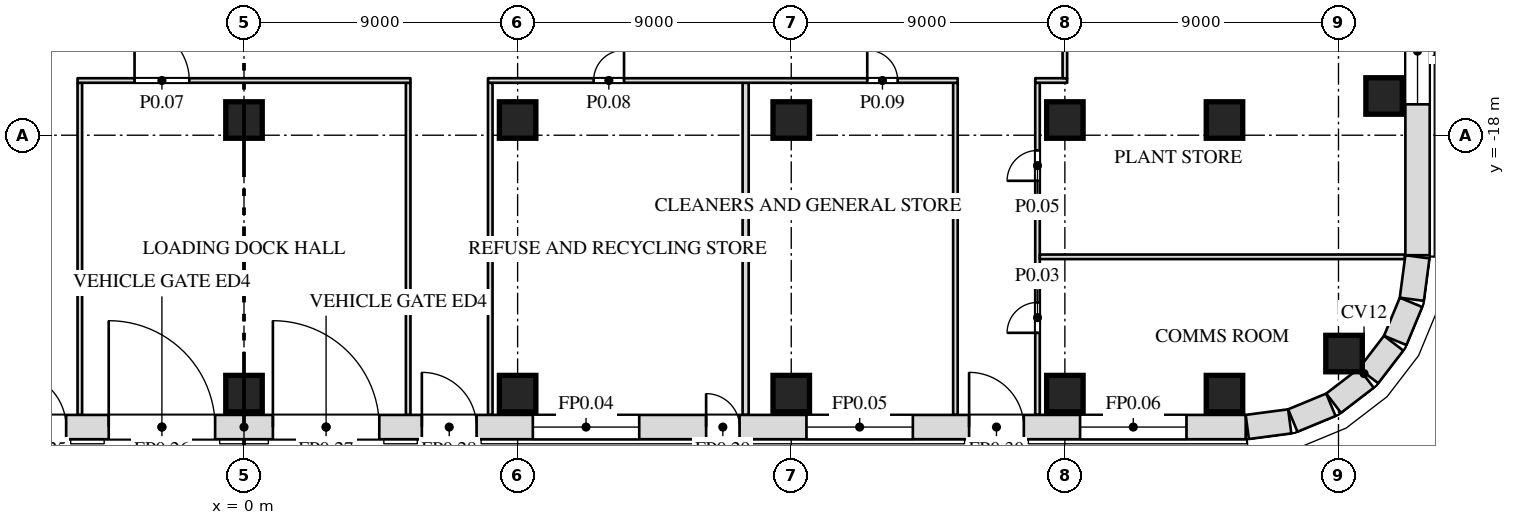
"""IFC4 building model, lengths in metres.
Left out: names, types, materials, properties, quantities, classifications, styles, units other than length and angle.
Written with IfcOpenShell. Run it as: python <this file> out.ifc"""

import sys

from ifc_helpers import new_model, si_unit, direction, frame, frame_2d, origin, origin_2d, place, context, subcontext, project, spatial, rectangle, extrude, element, fill, save


model = new_model("IFC4")
c1 = context("Model", 3, precision=1e-05, world=origin(), true_north=direction((0.0, 1.0)))
c2 = subcontext(c1, "Body", "Model", "MODEL_VIEW")
j1 = project(units=[si_unit("LENGTHUNIT", "METRE"), si_unit("PLANEANGLEUNIT", "RADIAN")], contexts=[c1])
p1 = place(None, origin())
s1 = spatial("IfcSite", under=j1, at=p1, CompositionType="ELEMENT")
p2 = place(p1, origin())
s2 = spatial("IfcBuilding", under=s1, at=p2, CompositionType="ELEMENT")
p3 = place(p2, origin())
s3 = spatial("IfcBuildingStorey", under=s2, at=p3, CompositionType="ELEMENT", Elevation=0.0)
for number, where, z_axis, x_axis in (
    (1, (0.0, -26.5, 0.0), (0.0, 0.0, 1.0), (1.0, 0.0, 0.0)),
    (2, (9.0, -26.5, 0.0), (0.0, 0.0, 1.0), (1.0, 0.0, 0.0)),
    (3, (18.0, -26.5, 0.0), (0.0, 0.0, 1.0), (1.0, 0.0, 0.0)),
    (4, (27.0, -26.5, 0.0), (0.0, 0.0, 1.0), (1.0, 0.0, 0.0)),
    (5, (32.25, -26.5, 0.0), (0.0, 0.0, 1.0), (1.0, 0.0, 0.0)),
    (6, (36.182, -25.182, 0.0), (0.0, 0.0, 1.0), (1.0, 0.0, 0.0)),
    (7, (0.0, -17.5, 0.0), (0.0, 0.0, 1.0), (1.0, 0.0, 0.0)),
    (8, (9.0, -17.5, 0.0), (0.0, 0.0, 1.0), (1.0, 0.0, 0.0)),
    (9, (18.0, -17.5, 0.0), (0.0, 0.0, 1.0), (1.0, 0.0, 0.0)),
    (10, (27.0, -17.5, 0.0), (0.0, 0.0, 1.0), (1.0, 0.0, 0.0)),
    (11, (32.25, -17.5, 0.0), (0.0, 0.0, 1.0), (1.0, 0.0, 0.0)),
    (12, (37.5, -16.709, 0.0), (0.0, 0.0, 1.0), (1.0, 0.0, 0.0)),
):
    element("IfcColumn", number, at=place(p3, frame(where, z_axis=z_axis, x_axis=x_axis)), inside=s3, PredefinedType="COLUMN", context=c2, shape_type="SweptSolid", body=[
        extrude(rectangle(XDim=1.2, YDim=1.2, at=origin_2d()), origin(), (0.0, 0.0, 1.0), 9.0),
    ])
for number, where, z_axis, x_axis in (
    (13, (-5.4, -27.2, 0.0), (0.0, 0.0, 1.0), (0.0, 1.0, 0.0)),
    (14, (5.4, -27.2, 0.0), (0.0, 0.0, 1.0), (0.0, 1.0, 0.0)),
    (15, (8.1, -27.2, 0.0), (0.0, 0.0, 1.0), (0.0, 1.0, 0.0)),
):
    element("IfcWall", number, at=place(p3, frame(where, z_axis=z_axis, x_axis=x_axis)), inside=s3, PredefinedType="PARTITIONING", context=c2, shape_type="SweptSolid", body=[
        extrude(rectangle(XDim=10.925, YDim=0.15, at=frame_2d((5.462, 0.0))), origin(), (0.0, 0.0, 1.0), 8.7),
    ])
p4 = place(p3, frame((16.5, -27.2, 0.0), z_axis=(0.0, 0.0, 1.0), x_axis=(0.0, 1.0, 0.0)))
e16 = element("IfcWall", 16, at=p4, inside=s3, PredefinedType="PARTITIONING", context=c2, shape_type="SweptSolid", body=[
    extrude(rectangle(XDim=10.925, YDim=0.2, at=frame_2d((5.462, 0.0))), origin(), (0.0, 0.0, 1.0), 8.7),
])
p5 = place(p3, frame((23.4, -27.2, 0.0), z_axis=(0.0, 0.0, 1.0), x_axis=(0.0, 1.0, 0.0)))
e17 = element("IfcWall", 17, at=p5, inside=s3, PredefinedType="PARTITIONING", context=c2, shape_type="SweptSolid", body=[
    extrude(rectangle(XDim=10.925, YDim=0.15, at=frame_2d((5.462, 0.0))), origin(), (0.0, 0.0, 1.0), 8.7),
])
p6 = place(p3, frame((26.1, -27.2, 0.0), z_axis=(0.0, 0.0, 1.0), x_axis=(0.0, 1.0, 0.0)))
e18 = element("IfcWall", 18, at=p6, inside=s3, PredefinedType="PARTITIONING", context=c2, shape_type="SweptSolid", body=[
    extrude(rectangle(XDim=10.925, YDim=0.15, at=frame_2d((5.462, 0.0))), origin(), (0.0, 0.0, 1.0), 8.7),
])
p7 = place(p6, frame((2.7, 0.0, 0.0)))
e19 = element("IfcOpeningElement", 19, at=p7, cuts=e18, PredefinedType="OPENING", context=c2, shape_type="SweptSolid", body=[
    extrude(rectangle(XDim=1.0, YDim=2.1, at=frame_2d((0.5, 1.05))), frame((0.0, 0.087, 0.0), z_axis=(0.0, -1.0, 0.0), x_axis=(1.0, 0.0, 0.0)), (0.0, 0.0, 1.0), 0.174),
])
p8 = place(p6, frame((7.7, 0.0, 0.0)))
e20 = element("IfcOpeningElement", 20, at=p8, cuts=e18, PredefinedType="OPENING", context=c2, shape_type="SweptSolid", body=[
    extrude(rectangle(XDim=1.0, YDim=2.1, at=frame_2d((0.5, 1.05))), frame((0.0, 0.087, 0.0), z_axis=(0.0, -1.0, 0.0), x_axis=(1.0, 0.0, 0.0)), (0.0, 0.0, 1.0), 0.174),
])
p9 = place(p3, frame((26.175, -22.0, 0.0), z_axis=(0.0, 0.0, 1.0), x_axis=(1.0, 0.0, 0.0)))
e21 = element("IfcWall", 21, at=p9, inside=s3, PredefinedType="PARTITIONING", context=c2, shape_type="SweptSolid", body=[
    extrude(rectangle(XDim=12.005, YDim=0.15, at=frame_2d((6.002, 0.0))), origin(), (0.0, 0.0, 1.0), 8.7),
])
p10 = place(p3, frame((-5.475, -16.2, 0.0), z_axis=(0.0, 0.0, 1.0), x_axis=(1.0, 0.0, 0.0)))
e22 = element("IfcWall", 22, at=p10, inside=s3, PredefinedType="PARTITIONING", context=c2, shape_type="SweptSolid", body=[
    extrude(rectangle(XDim=10.95, YDim=0.15, at=frame_2d((5.475, 0.0))), origin(), (0.0, 0.0, 1.0), 8.7),
])
p11 = place(p10, frame((1.875, 0.0, 0.0)))
e23 = element("IfcOpeningElement", 23, at=p11, cuts=e22, PredefinedType="OPENING", context=c2, shape_type="SweptSolid", body=[
    extrude(rectangle(XDim=1.8, YDim=2.1, at=frame_2d((0.9, 1.05))), frame((0.0, 0.087, 0.0), z_axis=(0.0, -1.0, 0.0), x_axis=(1.0, 0.0, 0.0)), (0.0, 0.0, 1.0), 0.174),
])
p12 = place(p3, frame((8.025, -16.2, 0.0), z_axis=(0.0, 0.0, 1.0), x_axis=(1.0, 0.0, 0.0)))
e24 = element("IfcWall", 24, at=p12, inside=s3, PredefinedType="PARTITIONING", context=c2, shape_type="SweptSolid", body=[
    extrude(rectangle(XDim=15.45, YDim=0.15, at=frame_2d((7.725, 0.0))), origin(), (0.0, 0.0, 1.0), 8.7),
])
p13 = place(p12, frame((3.475, 0.0, 0.0)))
e25 = element("IfcOpeningElement", 25, at=p13, cuts=e24, PredefinedType="OPENING", context=c2, shape_type="SweptSolid", body=[
    extrude(rectangle(XDim=1.0, YDim=2.1, at=frame_2d((0.5, 1.05))), frame((0.0, 0.087, 0.0), z_axis=(0.0, -1.0, 0.0), x_axis=(1.0, 0.0, 0.0)), (0.0, 0.0, 1.0), 0.174),
])
p14 = place(p12, frame((12.475, 0.0, 0.0)))
e26 = element("IfcOpeningElement", 26, at=p14, cuts=e24, PredefinedType="OPENING", context=c2, shape_type="SweptSolid", body=[
    extrude(rectangle(XDim=1.0, YDim=2.1, at=frame_2d((0.5, 1.05))), frame((0.0, 0.087, 0.0), z_axis=(0.0, -1.0, 0.0), x_axis=(1.0, 0.0, 0.0)), (0.0, 0.0, 1.0), 0.174),
])
p15 = place(p3, frame((26.025, -16.2, 0.0), z_axis=(0.0, 0.0, 1.0), x_axis=(1.0, 0.0, 0.0)))
e27 = element("IfcWall", 27, at=p15, inside=s3, PredefinedType="PARTITIONING", context=c2, shape_type="SweptSolid", body=[
    extrude(rectangle(XDim=1.05, YDim=0.15, at=frame_2d((0.525, 0.0))), origin(), (0.0, 0.0, 1.0), 8.7),
])
p16 = place(p3, frame((27.0, -16.125, 0.0), z_axis=(0.0, 0.0, 1.0), x_axis=(0.0, 1.0, 0.0)))
e28 = element("IfcWall", 28, at=p16, inside=s3, PredefinedType="PARTITIONING", context=c2, shape_type="SweptSolid", body=[
    extrude(rectangle(XDim=2.025, YDim=0.15, at=frame_2d((1.012, 0.0))), origin(), (0.0, 0.0, 1.0), 8.088),
])
p17 = place(p3, frame((-32.948, -27.6, 0.0), z_axis=(0.0, 0.0, 1.0), x_axis=(1.0, 0.0, 0.0)))
e29 = element("IfcWall", 29, at=p17, inside=s3, PredefinedType="SOLIDWALL", context=c2, shape_type="SweptSolid", body=[
    extrude(rectangle(XDim=65.895, YDim=0.8, at=frame_2d((32.948, 0.0))), origin(), (0.0, 0.0, 1.0), 8.7),
])
p18 = place(p17, frame((1.948, 0.0, 1.0)))
e30 = element("IfcOpeningElement", 30, at=p18, cuts=e29, PredefinedType="OPENING", context=c2, shape_type="SweptSolid", body=[
    extrude(rectangle(XDim=3.5, YDim=5.5, at=frame_2d((1.75, 2.75))), frame((0.0, 0.412, 0.0), z_axis=(0.0, -1.0, 0.0), x_axis=(1.0, 0.0, 0.0)), (0.0, 0.0, 1.0), 0.824),
])
p19 = place(p17, frame((10.948, 0.0, 1.0)))
e31 = element("IfcOpeningElement", 31, at=p19, cuts=e29, PredefinedType="OPENING", context=c2, shape_type="SweptSolid", body=[
    extrude(rectangle(XDim=3.5, YDim=5.5, at=frame_2d((1.75, 2.75))), frame((0.0, 0.412, 0.0), z_axis=(0.0, -1.0, 0.0), x_axis=(1.0, 0.0, 0.0)), (0.0, 0.0, 1.0), 0.824),
])
p20 = place(p17, frame((19.948, 0.0, 1.0)))
e32 = element("IfcOpeningElement", 32, at=p20, cuts=e29, PredefinedType="OPENING", context=c2, shape_type="SweptSolid", body=[
    extrude(rectangle(XDim=3.5, YDim=5.5, at=frame_2d((1.75, 2.75))), frame((0.0, 0.412, 0.0), z_axis=(0.0, -1.0, 0.0), x_axis=(1.0, 0.0, 0.0)), (0.0, 0.0, 1.0), 0.824),
])
p21 = place(p17, frame((42.448, 0.0, 1.0)))
e33 = element("IfcOpeningElement", 33, at=p21, cuts=e29, PredefinedType="OPENING", context=c2, shape_type="SweptSolid", body=[
    extrude(rectangle(XDim=3.5, YDim=5.5, at=frame_2d((1.75, 2.75))), frame((0.0, 0.412, 0.0), z_axis=(0.0, -1.0, 0.0), x_axis=(1.0, 0.0, 0.0)), (0.0, 0.0, 1.0), 0.824),
])
p22 = place(p17, frame((51.448, 0.0, 1.0)))
e34 = element("IfcOpeningElement", 34, at=p22, cuts=e29, PredefinedType="OPENING", context=c2, shape_type="SweptSolid", body=[
    extrude(rectangle(XDim=3.5, YDim=5.5, at=frame_2d((1.75, 2.75))), frame((0.0, 0.412, 0.0), z_axis=(0.0, -1.0, 0.0), x_axis=(1.0, 0.0, 0.0)), (0.0, 0.0, 1.0), 0.824),
])
p23 = place(p17, frame((60.448, 0.0, 1.0)))
e35 = element("IfcOpeningElement", 35, at=p23, cuts=e29, PredefinedType="OPENING", context=c2, shape_type="SweptSolid", body=[
    extrude(rectangle(XDim=3.5, YDim=5.5, at=frame_2d((1.75, 2.75))), frame((0.0, 0.412, 0.0), z_axis=(0.0, -1.0, 0.0), x_axis=(1.0, 0.0, 0.0)), (0.0, 0.0, 1.0), 0.824),
])
p24 = place(p17, frame((7.298, 0.0, 0.0)))
e36 = element("IfcOpeningElement", 36, at=p24, cuts=e29, PredefinedType="OPENING", context=c2, shape_type="SweptSolid", body=[
    extrude(rectangle(XDim=1.8, YDim=2.4, at=frame_2d((0.9, 1.2))), frame((0.0, 0.412, 0.0), z_axis=(0.0, -1.0, 0.0), x_axis=(1.0, 0.0, 0.0)), (0.0, 0.0, 1.0), 0.824),
])
p25 = place(p17, frame((16.648, 0.0, 0.0)))
e37 = element("IfcOpeningElement", 37, at=p25, cuts=e29, PredefinedType="OPENING", context=c2, shape_type="SweptSolid", body=[
    extrude(rectangle(XDim=1.1, YDim=2.4, at=frame_2d((0.55, 1.2))), frame((0.0, 0.412, 0.0), z_axis=(0.0, -1.0, 0.0), x_axis=(1.0, 0.0, 0.0)), (0.0, 0.0, 1.0), 0.824),
])
p26 = place(p17, frame((25.298, 0.0, 0.0)))
e38 = element("IfcOpeningElement", 38, at=p26, cuts=e29, PredefinedType="OPENING", context=c2, shape_type="SweptSolid", body=[
    extrude(rectangle(XDim=1.8, YDim=2.4, at=frame_2d((0.9, 1.2))), frame((0.0, 0.412, 0.0), z_axis=(0.0, -1.0, 0.0), x_axis=(1.0, 0.0, 0.0)), (0.0, 0.0, 1.0), 0.824),
])
p27 = place(p17, frame((28.498, 0.0, 0.0)))
e39 = element("IfcOpeningElement", 39, at=p27, cuts=e29, PredefinedType="OPENING", context=c2, shape_type="SweptSolid", body=[
    extrude(rectangle(XDim=3.5, YDim=4.5, at=frame_2d((1.75, 2.25))), frame((0.0, 0.412, 0.0), z_axis=(0.0, -1.0, 0.0), x_axis=(1.0, 0.0, 0.0)), (0.0, 0.0, 1.0), 0.824),
])
p28 = place(p17, frame((33.898, 0.0, 0.0)))
e40 = element("IfcOpeningElement", 40, at=p28, cuts=e29, PredefinedType="OPENING", context=c2, shape_type="SweptSolid", body=[
    extrude(rectangle(XDim=3.5, YDim=4.5, at=frame_2d((1.75, 2.25))), frame((0.0, 0.412, 0.0), z_axis=(0.0, -1.0, 0.0), x_axis=(1.0, 0.0, 0.0)), (0.0, 0.0, 1.0), 0.824),
])
p29 = place(p17, frame((38.798, 0.0, 0.0)))
e41 = element("IfcOpeningElement", 41, at=p29, cuts=e29, PredefinedType="OPENING", context=c2, shape_type="SweptSolid", body=[
    extrude(rectangle(XDim=1.8, YDim=2.4, at=frame_2d((0.9, 1.2))), frame((0.0, 0.412, 0.0), z_axis=(0.0, -1.0, 0.0), x_axis=(1.0, 0.0, 0.0)), (0.0, 0.0, 1.0), 0.824),
])
p30 = place(p17, frame((48.148, 0.0, 0.0)))
e42 = element("IfcOpeningElement", 42, at=p30, cuts=e29, PredefinedType="OPENING", context=c2, shape_type="SweptSolid", body=[
    extrude(rectangle(XDim=1.1, YDim=2.4, at=frame_2d((0.55, 1.2))), frame((0.0, 0.412, 0.0), z_axis=(0.0, -1.0, 0.0), x_axis=(1.0, 0.0, 0.0)), (0.0, 0.0, 1.0), 0.824),
])
p31 = place(p17, frame((56.798, 0.0, 0.0)))
e43 = element("IfcOpeningElement", 43, at=p31, cuts=e29, PredefinedType="OPENING", context=c2, shape_type="SweptSolid", body=[
    extrude(rectangle(XDim=1.8, YDim=2.4, at=frame_2d((0.9, 1.2))), frame((0.0, 0.412, 0.0), z_axis=(0.0, -1.0, 0.0), x_axis=(1.0, 0.0, 0.0)), (0.0, 0.0, 1.0), 0.824),
])
p32 = place(p3, frame((33.0, -27.597, 0.0), z_axis=(0.0, 0.0, 1.0), x_axis=(0.99144603414, 0.130517283865, 0.0)))
e44 = element("IfcWall", 44, at=p32, inside=s3, PredefinedType="SOLIDWALL", context=c2, shape_type="SweptSolid", body=[
    extrude(rectangle(XDim=1.408, YDim=0.8, at=frame_2d((0.704, 0.0))), origin(), (0.0, 0.0, 1.0), 8.7),
])
p33 = place(p3, frame((34.497, -27.386, 0.0), z_axis=(0.0, 0.0, 1.0), x_axis=(0.923847774587, 0.38276009378, 0.0)))
e45 = element("IfcWall", 45, at=p33, inside=s3, PredefinedType="SOLIDWALL", context=c2, shape_type="SweptSolid", body=[
    extrude(rectangle(XDim=1.355, YDim=0.8, at=frame_2d((0.678, 0.0))), origin(), (0.0, 0.0, 1.0), 8.7),
])
for number, where, z_axis, x_axis in (
    (46, (35.84, -26.815, 0.0), (0.0, 0.0, 1.0), (0.793, 0.609, 0.0)),
    (47, (36.989, -25.916, 0.0), (0.0, 0.0, 1.0), (0.609, 0.793, 0.0)),
):
    element("IfcWall", number, at=place(p3, frame(where, z_axis=z_axis, x_axis=x_axis)), inside=s3, PredefinedType="SOLIDWALL", context=c2, shape_type="SweptSolid", body=[
        extrude(rectangle(XDim=1.356, YDim=0.8, at=frame_2d((0.678, 0.0))), origin(), (0.0, 0.0, 1.0), 8.7),
    ])
p34 = place(p3, frame((37.867, -24.75, 0.0), z_axis=(0.0, 0.0, 1.0), x_axis=(0.38276009378, 0.923847774587, 0.0)))
e48 = element("IfcWall", 48, at=p34, inside=s3, PredefinedType="SOLIDWALL", context=c2, shape_type="SweptSolid", body=[
    extrude(rectangle(XDim=1.355, YDim=0.8, at=frame_2d((0.678, 0.0))), origin(), (0.0, 0.0, 1.0), 8.7),
])
p35 = place(p3, frame((38.413, -23.396, 0.0), z_axis=(0.0, 0.0, 1.0), x_axis=(0.130517283865, 0.99144603414, 0.0)))
e49 = element("IfcWall", 49, at=p35, inside=s3, PredefinedType="SOLIDWALL", context=c2, shape_type="SweptSolid", body=[
    extrude(rectangle(XDim=1.408, YDim=0.8, at=frame_2d((0.704, 0.0))), origin(), (0.0, 0.0, 1.0), 8.7),
])
p36 = place(p3, frame((38.6, -21.948, 0.0), z_axis=(0.0, 0.0, 1.0), x_axis=(0.0, 1.0, 0.0)))
e50 = element("IfcWall", 50, at=p36, inside=s3, PredefinedType="SOLIDWALL", context=c2, shape_type="SweptSolid", body=[
    extrude(rectangle(XDim=35.895, YDim=0.8, at=frame_2d((17.948, 0.0))), origin(), (0.0, 0.0, 1.0), 8.7),
])
p37 = place(p36, frame((4.964, 0.0, 1.0)))
e51 = element("IfcOpeningElement", 51, at=p37, cuts=e50, PredefinedType="OPENING", context=c2, shape_type="SweptSolid", body=[
    extrude(rectangle(XDim=3.5, YDim=5.5, at=frame_2d((1.75, 2.75))), frame((0.0, 0.412, 0.0), z_axis=(0.0, -1.0, 0.0), x_axis=(1.0, 0.0, 0.0)), (0.0, 0.0, 1.0), 0.824),
])
p38 = place(p36, frame((9.458, 0.0, 1.0)))
e52 = element("IfcOpeningElement", 52, at=p38, cuts=e50, PredefinedType="OPENING", context=c2, shape_type="SweptSolid", body=[
    extrude(rectangle(XDim=3.5, YDim=5.5, at=frame_2d((1.75, 2.75))), frame((0.0, 0.412, 0.0), z_axis=(0.0, -1.0, 0.0), x_axis=(1.0, 0.0, 0.0)), (0.0, 0.0, 1.0), 0.824),
])
p39 = place(p36, frame((13.951, 0.0, 1.0)))
e53 = element("IfcOpeningElement", 53, at=p39, cuts=e50, PredefinedType="OPENING", context=c2, shape_type="SweptSolid", body=[
    extrude(rectangle(XDim=3.5, YDim=5.5, at=frame_2d((1.75, 2.75))), frame((0.0, 0.412, 0.0), z_axis=(0.0, -1.0, 0.0), x_axis=(1.0, 0.0, 0.0)), (0.0, 0.0, 1.0), 0.824),
])
p40 = place(p36, frame((22.938, 0.0, 1.0)))
e54 = element("IfcOpeningElement", 54, at=p40, cuts=e50, PredefinedType="OPENING", context=c2, shape_type="SweptSolid", body=[
    extrude(rectangle(XDim=3.5, YDim=5.5, at=frame_2d((1.75, 2.75))), frame((0.0, 0.412, 0.0), z_axis=(0.0, -1.0, 0.0), x_axis=(1.0, 0.0, 0.0)), (0.0, 0.0, 1.0), 0.824),
])
p41 = place(p36, frame((27.431, 0.0, 1.0)))
e55 = element("IfcOpeningElement", 55, at=p41, cuts=e50, PredefinedType="OPENING", context=c2, shape_type="SweptSolid", body=[
    extrude(rectangle(XDim=3.5, YDim=5.5, at=frame_2d((1.75, 2.75))), frame((0.0, 0.412, 0.0), z_axis=(0.0, -1.0, 0.0), x_axis=(1.0, 0.0, 0.0)), (0.0, 0.0, 1.0), 0.824),
])
p42 = place(p36, frame((19.294, 0.0, 0.0)))
e56 = element("IfcOpeningElement", 56, at=p42, cuts=e50, PredefinedType="OPENING", context=c2, shape_type="SweptSolid", body=[
    extrude(rectangle(XDim=1.8, YDim=2.4, at=frame_2d((0.9, 1.2))), frame((0.0, 0.412, 0.0), z_axis=(0.0, -1.0, 0.0), x_axis=(1.0, 0.0, 0.0)), (0.0, 0.0, 1.0), 0.824),
])
p43 = place(p7, origin())
e57 = element("IfcDoor", 57, at=p43, inside=s3, OperationType="SINGLE_SWING_LEFT", PredefinedType="DOOR", context=c2, shape_type="SweptSolid", body=[
    extrude(rectangle(XDim=1.0, YDim=2.1, at=frame_2d((0.5, 1.05))), frame((0.0, 0.025, 0.0), z_axis=(0.0, -1.0, 0.0), x_axis=(1.0, 0.0, 0.0)), (0.0, 0.0, 1.0), 0.05),
])
fill(e19, e57)
p44 = place(p8, origin())
e58 = element("IfcDoor", 58, at=p44, inside=s3, OperationType="SINGLE_SWING_LEFT", PredefinedType="DOOR", context=c2, shape_type="SweptSolid", body=[
    extrude(rectangle(XDim=1.0, YDim=2.1, at=frame_2d((0.5, 1.05))), frame((0.0, 0.025, 0.0), z_axis=(0.0, -1.0, 0.0), x_axis=(1.0, 0.0, 0.0)), (0.0, 0.0, 1.0), 0.05),
])
fill(e20, e58)
p45 = place(p11, origin())
e59 = element("IfcDoor", 59, at=p45, inside=s3, OperationType="DOUBLE_DOOR_SINGLE_SWING", PredefinedType="DOOR", context=c2, shape_type="SweptSolid", body=[
    extrude(rectangle(XDim=1.8, YDim=2.1, at=frame_2d((0.9, 1.05))), frame((0.0, 0.025, 0.0), z_axis=(0.0, -1.0, 0.0), x_axis=(1.0, 0.0, 0.0)), (0.0, 0.0, 1.0), 0.05),
])
fill(e23, e59)
p46 = place(p13, origin())
e60 = element("IfcDoor", 60, at=p46, inside=s3, OperationType="SINGLE_SWING_RIGHT", PredefinedType="DOOR", context=c2, shape_type="SweptSolid", body=[
    extrude(rectangle(XDim=1.0, YDim=2.1, at=frame_2d((0.5, 1.05))), frame((0.0, 0.025, 0.0), z_axis=(0.0, -1.0, 0.0), x_axis=(1.0, 0.0, 0.0)), (0.0, 0.0, 1.0), 0.05),
])
fill(e25, e60)
p47 = place(p14, origin())
e61 = element("IfcDoor", 61, at=p47, inside=s3, OperationType="SINGLE_SWING_LEFT", PredefinedType="DOOR", context=c2, shape_type="SweptSolid", body=[
    extrude(rectangle(XDim=1.0, YDim=2.1, at=frame_2d((0.5, 1.05))), frame((0.0, 0.025, 0.0), z_axis=(0.0, -1.0, 0.0), x_axis=(1.0, 0.0, 0.0)), (0.0, 0.0, 1.0), 0.05),
])
fill(e26, e61)
p48 = place(p21, origin())
e62 = element("IfcWindow", 62, at=p48, inside=s3, PartitioningType="SINGLE_PANEL", PredefinedType="WINDOW", context=c2, shape_type="SweptSolid", body=[
    extrude(rectangle(XDim=3.5, YDim=5.5, at=frame_2d((1.75, 2.75))), frame((0.0, 0.03, 0.0), z_axis=(0.0, -1.0, 0.0), x_axis=(1.0, 0.0, 0.0)), (0.0, 0.0, 1.0), 0.06),
])
fill(e33, e62)
p49 = place(p22, origin())
e63 = element("IfcWindow", 63, at=p49, inside=s3, PartitioningType="SINGLE_PANEL", PredefinedType="WINDOW", context=c2, shape_type="SweptSolid", body=[
    extrude(rectangle(XDim=3.5, YDim=5.5, at=frame_2d((1.75, 2.75))), frame((0.0, 0.03, 0.0), z_axis=(0.0, -1.0, 0.0), x_axis=(1.0, 0.0, 0.0)), (0.0, 0.0, 1.0), 0.06),
])
fill(e34, e63)
p50 = place(p23, origin())
e64 = element("IfcWindow", 64, at=p50, inside=s3, PartitioningType="SINGLE_PANEL", PredefinedType="WINDOW", context=c2, shape_type="SweptSolid", body=[
    extrude(rectangle(XDim=3.5, YDim=5.5, at=frame_2d((1.75, 2.75))), frame((0.0, 0.03, 0.0), z_axis=(0.0, -1.0, 0.0), x_axis=(1.0, 0.0, 0.0)), (0.0, 0.0, 1.0), 0.06),
])
fill(e35, e64)
p51 = place(p37, origin())
e65 = element("IfcWindow", 65, at=p51, inside=s3, PartitioningType="SINGLE_PANEL", PredefinedType="WINDOW", context=c2, shape_type="SweptSolid", body=[
    extrude(rectangle(XDim=3.5, YDim=5.5, at=frame_2d((1.75, 2.75))), frame((0.0, 0.03, 0.0), z_axis=(0.0, -1.0, 0.0), x_axis=(1.0, 0.0, 0.0)), (0.0, 0.0, 1.0), 0.06),
])
fill(e51, e65)
p52 = place(p26, frame((1.8, 0.0, 0.0), z_axis=(0.0, 0.0, 1.0), x_axis=(-1.0, 0.0, 0.0)))
e66 = element("IfcDoor", 66, at=p52, inside=s3, OperationType="DOUBLE_DOOR_SINGLE_SWING", PredefinedType="DOOR", context=c2, shape_type="SweptSolid", body=[
    extrude(rectangle(XDim=1.8, YDim=2.4, at=frame_2d((0.9, 1.2))), frame((0.0, 0.025, 0.0), z_axis=(0.0, -1.0, 0.0), x_axis=(1.0, 0.0, 0.0)), (0.0, 0.0, 1.0), 0.05),
])
fill(e38, e66)
p53 = place(p27, origin())
e67 = element("IfcDoor", 67, at=p53, inside=s3, OperationType="ROLLINGUP", PredefinedType="GATE", context=c2, shape_type="SweptSolid", body=[
    extrude(rectangle(XDim=3.5, YDim=4.5, at=frame_2d((1.75, 2.25))), frame((0.0, 0.025, 0.0), z_axis=(0.0, -1.0, 0.0), x_axis=(1.0, 0.0, 0.0)), (0.0, 0.0, 1.0), 0.05),
])
fill(e39, e67)
p54 = place(p28, origin())
e68 = element("IfcDoor", 68, at=p54, inside=s3, OperationType="ROLLINGUP", PredefinedType="GATE", context=c2, shape_type="SweptSolid", body=[
    extrude(rectangle(XDim=3.5, YDim=4.5, at=frame_2d((1.75, 2.25))), frame((0.0, 0.025, 0.0), z_axis=(0.0, -1.0, 0.0), x_axis=(1.0, 0.0, 0.0)), (0.0, 0.0, 1.0), 0.05),
])
fill(e40, e68)
p55 = place(p29, frame((1.8, 0.0, 0.0), z_axis=(0.0, 0.0, 1.0), x_axis=(-1.0, 0.0, 0.0)))
e69 = element("IfcDoor", 69, at=p55, inside=s3, OperationType="DOUBLE_DOOR_SINGLE_SWING", PredefinedType="DOOR", context=c2, shape_type="SweptSolid", body=[
    extrude(rectangle(XDim=1.8, YDim=2.4, at=frame_2d((0.9, 1.2))), frame((0.0, 0.025, 0.0), z_axis=(0.0, -1.0, 0.0), x_axis=(1.0, 0.0, 0.0)), (0.0, 0.0, 1.0), 0.05),
])
fill(e41, e69)
p56 = place(p30, frame((1.1, 0.0, 0.0), z_axis=(0.0, 0.0, 1.0), x_axis=(-1.0, 0.0, 0.0)))
e70 = element("IfcDoor", 70, at=p56, inside=s3, OperationType="SINGLE_SWING_LEFT", PredefinedType="DOOR", context=c2, shape_type="SweptSolid", body=[
    extrude(rectangle(XDim=1.1, YDim=2.4, at=frame_2d((0.55, 1.2))), frame((0.0, 0.025, 0.0), z_axis=(0.0, -1.0, 0.0), x_axis=(1.0, 0.0, 0.0)), (0.0, 0.0, 1.0), 0.05),
])
fill(e42, e70)
p57 = place(p31, frame((1.8, 0.0, 0.0), z_axis=(0.0, 0.0, 1.0), x_axis=(-1.0, 0.0, 0.0)))
e71 = element("IfcDoor", 71, at=p57, inside=s3, OperationType="DOUBLE_DOOR_SINGLE_SWING", PredefinedType="DOOR", context=c2, shape_type="SweptSolid", body=[
    extrude(rectangle(XDim=1.8, YDim=2.4, at=frame_2d((0.9, 1.2))), frame((0.0, 0.025, 0.0), z_axis=(0.0, -1.0, 0.0), x_axis=(1.0, 0.0, 0.0)), (0.0, 0.0, 1.0), 0.05),
])
fill(e43, e71)
save(model, sys.argv[1])
